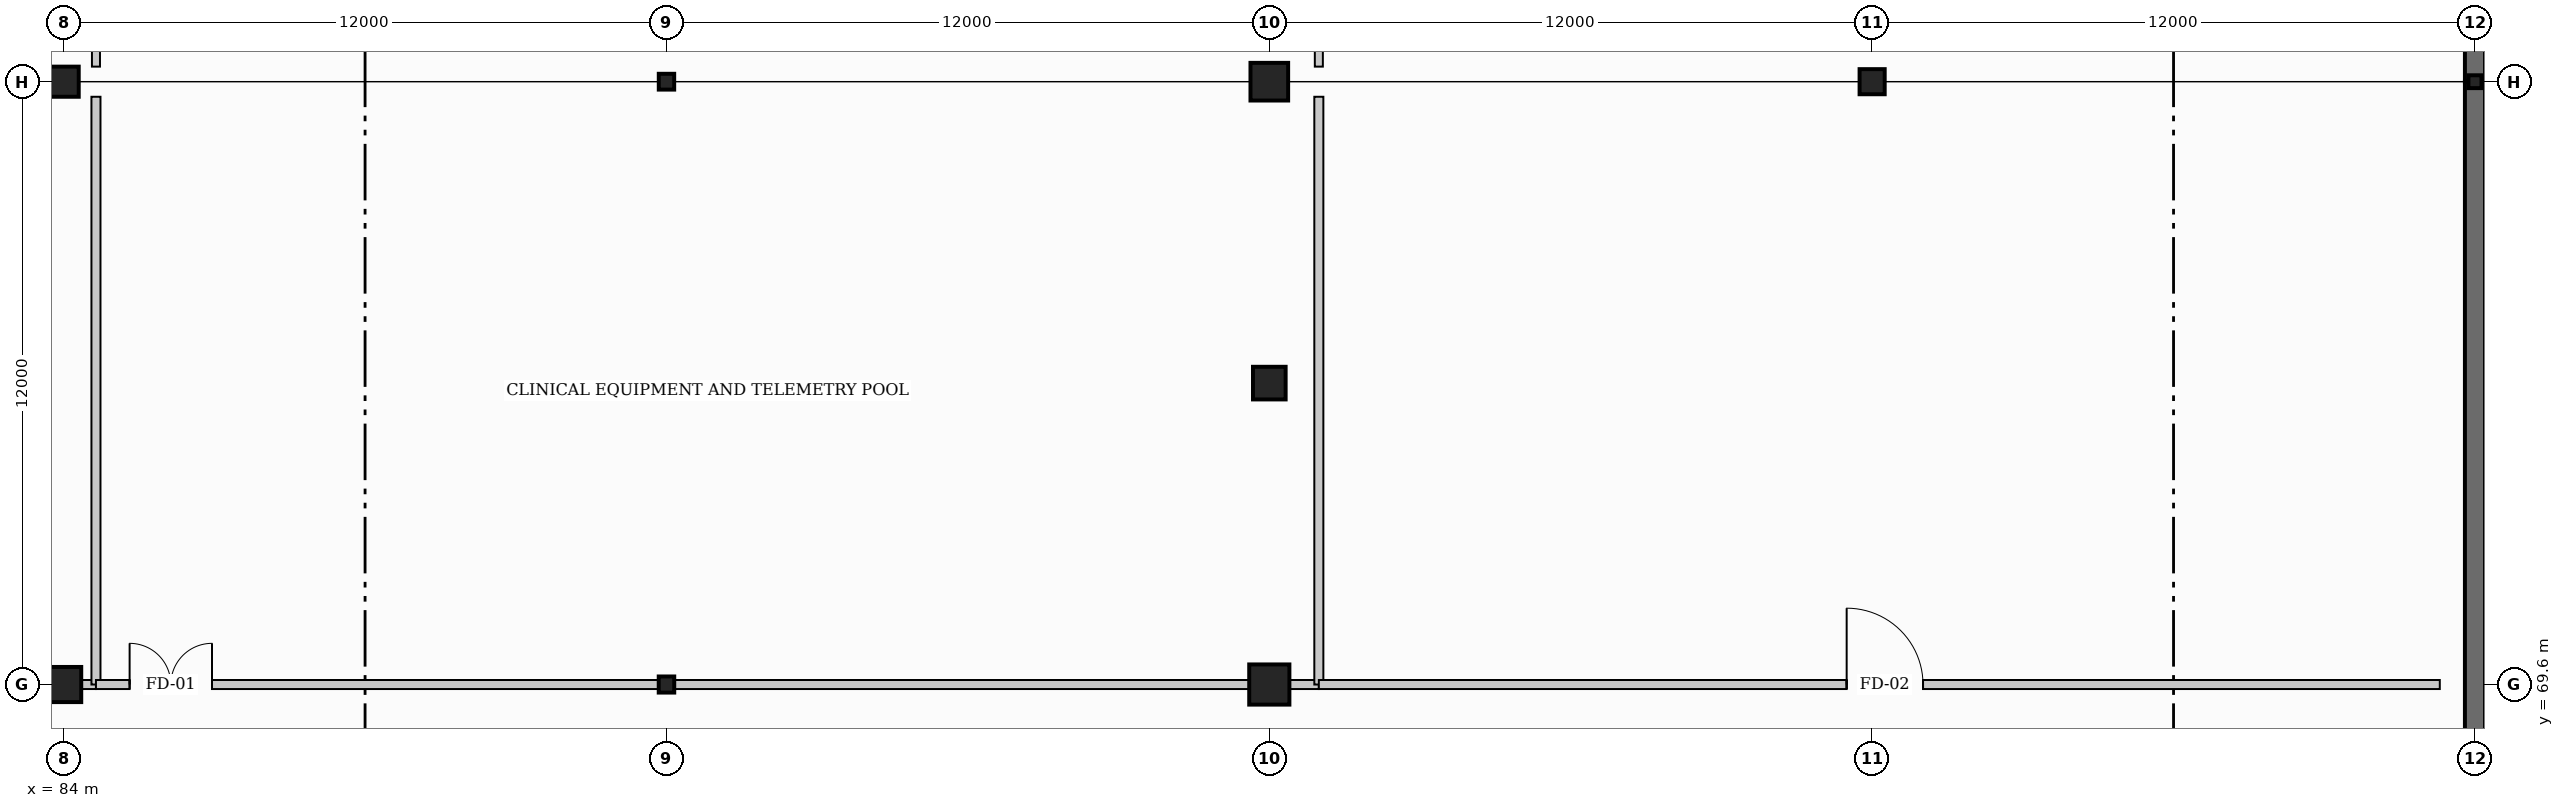
"""IFC4 building model, lengths in metres.
Left out: names, types, materials, properties, quantities, classifications, styles, units other than length and angle.
Written with IfcOpenShell. Run it as: python <this file> out.ifc"""

import sys

from ifc_helpers import new_model, si_unit, direction, frame, frame_2d, origin, origin_2d, place, context, subcontext, project, spatial, rectangle, i_section, extrude, element, fill, save


model = new_model("IFC4")
c1 = context("Model", 3, precision=1e-05, world=origin(), true_north=direction((0.0, 1.0)))
c2 = subcontext(c1, "Body", "Model", "MODEL_VIEW")
j1 = project(units=[si_unit("LENGTHUNIT", "METRE"), si_unit("PLANEANGLEUNIT", "RADIAN")], contexts=[c1])
p1 = place(None, origin())
s1 = spatial("IfcSite", under=j1, at=p1, CompositionType="ELEMENT")
p2 = place(p1, origin())
s2 = spatial("IfcBuilding", under=s1, at=p2, CompositionType="ELEMENT")
p3 = place(p2, frame((0.0, 0.0, -4.8)))
s3 = spatial("IfcBuildingStorey", under=s2, at=p3, CompositionType="ELEMENT", Elevation=-4.8)
p4 = place(p3, frame((132.0, 81.6, 0.0), z_axis=(0.0, 0.0, 1.0), x_axis=(0.0, 1.0, 0.0)))
e1 = element("IfcWall", 1, at=p4, inside=s3, PredefinedType="USERDEFINED", context=c2, shape_type="SweptSolid", body=[
    extrude(rectangle(XDim=44.0, YDim=0.4, at=frame_2d((22.0, 0.0))), origin(), (0.0, 0.0, 1.0), 4.8),
])
p5 = place(p3, frame((132.0, 45.6, 0.0), z_axis=(0.0, 0.0, 1.0), x_axis=(0.0, 1.0, 0.0)))
e2 = element("IfcWall", 2, at=p5, inside=s3, PredefinedType="USERDEFINED", context=c2, shape_type="SweptSolid", body=[
    extrude(rectangle(XDim=36.0, YDim=0.4, at=frame_2d((18.0, 0.0))), origin(), (0.0, 0.0, 1.0), 4.8),
])
p6 = place(p3, frame((84.0, 69.6, 0.0), z_axis=(0.0, 0.0, 1.0), x_axis=(0.0, 1.0, 0.0)))
e3 = element("IfcColumn", 3, at=p6, inside=s3, PredefinedType="COLUMN", context=c2, shape_type="SweptSolid", body=[
    extrude(rectangle(XDim=0.7, YDim=0.7, at=origin_2d()), origin(), (0.0, 0.0, 1.0), 4.8),
])
p7 = place(p3, frame((84.0, 81.6, 0.0), z_axis=(0.0, 0.0, 1.0), x_axis=(0.0, 1.0, 0.0)))
e4 = element("IfcColumn", 4, at=p7, inside=s3, PredefinedType="COLUMN", context=c2, shape_type="SweptSolid", body=[
    extrude(rectangle(XDim=0.6, YDim=0.6, at=origin_2d()), origin(), (0.0, 0.0, 1.0), 4.8),
])
p8 = place(p3, frame((96.0, 69.6, 0.0), z_axis=(0.0, 0.0, 1.0), x_axis=(1.0, 0.0, 0.0)))
e5 = element("IfcColumn", 5, at=p8, inside=s3, PredefinedType="COLUMN", context=c2, shape_type="SweptSolid", body=[
    extrude(i_section(OverallWidth=0.309, OverallDepth=0.321, WebThickness=0.014, FlangeThickness=0.022, at=origin_2d()), origin(), (0.0, 0.0, 1.0), 4.8),
])
p9 = place(p3, frame((96.0, 81.6, 0.0), z_axis=(0.0, 0.0, 1.0), x_axis=(1.0, 0.0, 0.0)))
e6 = element("IfcColumn", 6, at=p9, inside=s3, PredefinedType="COLUMN", context=c2, shape_type="SweptSolid", body=[
    extrude(i_section(OverallWidth=0.307, OverallDepth=0.315, WebThickness=0.012, FlangeThickness=0.019, at=origin_2d()), origin(), (0.0, 0.0, 1.0), 4.8),
])
p10 = place(p3, frame((108.0, 69.6, 0.0), z_axis=(0.0, 0.0, 1.0), x_axis=(0.0, 1.0, 0.0)))
e7 = element("IfcColumn", 7, at=p10, inside=s3, PredefinedType="COLUMN", context=c2, shape_type="SweptSolid", body=[
    extrude(rectangle(XDim=0.8, YDim=0.8, at=origin_2d()), origin(), (0.0, 0.0, 1.0), 4.8),
])
p11 = place(p3, frame((108.0, 81.6, 0.0), z_axis=(0.0, 0.0, 1.0), x_axis=(0.0, 1.0, 0.0)))
e8 = element("IfcColumn", 8, at=p11, inside=s3, PredefinedType="COLUMN", context=c2, shape_type="SweptSolid", body=[
    extrude(rectangle(XDim=0.75, YDim=0.75, at=origin_2d()), origin(), (0.0, 0.0, 1.0), 4.8),
])
p12 = place(p3, frame((120.0, 81.6, 0.0), z_axis=(0.0, 0.0, 1.0), x_axis=(1.0, 0.0, 0.0)))
e9 = element("IfcColumn", 9, at=p12, inside=s3, PredefinedType="COLUMN", context=c2, shape_type="SweptSolid", body=[
    extrude(i_section(OverallWidth=0.5, OverallDepth=0.5, WebThickness=0.022, FlangeThickness=0.036, at=origin_2d()), origin(), (0.0, 0.0, 1.0), 4.8),
])
p13 = place(p3, frame((132.0, 81.6, 0.0), z_axis=(0.0, 0.0, 1.0), x_axis=(0.0, 1.0, 0.0)))
e10 = element("IfcColumn", 10, at=p13, inside=s3, PredefinedType="COLUMN", context=c2, shape_type="SweptSolid", body=[
    extrude(i_section(OverallWidth=0.256, OverallDepth=0.26, WebThickness=0.01, FlangeThickness=0.017, at=origin_2d()), origin(), (0.0, 0.0, 1.0), 4.8),
])
p14 = place(p3, frame((108.0, 75.6, 0.0), z_axis=(0.0, 0.0, 1.0), x_axis=(1.0, 0.0, 0.0)))
e11 = element("IfcColumn", 11, at=p14, inside=s3, PredefinedType="COLUMN", context=c2, shape_type="SweptSolid", body=[
    extrude(rectangle(XDim=0.65, YDim=0.65, at=origin_2d()), origin(), (0.0, 0.0, 1.0), 4.8),
])
p15 = place(p3, frame((60.3, 69.6, 0.0), z_axis=(0.0, 0.0, 1.0), x_axis=(1.0, 0.0, 0.0)))
e12 = element("IfcWall", 12, at=p15, inside=s3, PredefinedType="PARTITIONING", context=c2, shape_type="SweptSolid", body=[
    extrude(rectangle(XDim=24.343, YDim=0.18, at=frame_2d((12.171, 0.0))), origin(), (0.0, 0.0, 1.0), 3.465),
])
p16 = place(p15, frame((0.32, 0.0, 0.0)))
e13 = element("IfcOpeningElement", 13, at=p16, cuts=e12, PredefinedType="OPENING", context=c2, shape_type="SweptSolid", body=[
    extrude(rectangle(XDim=1.16, YDim=2.1, at=frame_2d((0.58, 1.05))), frame((0.0, 0.1, 0.0), z_axis=(0.0, -1.0, 0.0), x_axis=(1.0, 0.0, 0.0)), (0.0, 0.0, 1.0), 0.2),
])
p17 = place(p3, frame((84.643, 69.6, 0.0), z_axis=(0.0, 0.0, 1.0), x_axis=(0.0, 1.0, 0.0)))
e14 = element("IfcWall", 14, at=p17, inside=s3, PredefinedType="PARTITIONING", context=c2, shape_type="SweptSolid", body=[
    extrude(rectangle(XDim=11.7, YDim=0.18, at=frame_2d((5.85, 0.0))), origin(), (0.0, 0.0, 1.0), 3.515),
])
p18 = place(p3, frame((84.643, 69.6, 0.0), z_axis=(0.0, 0.0, 1.0), x_axis=(1.0, 0.0, 0.0)))
e15 = element("IfcWall", 15, at=p18, inside=s3, PredefinedType="PARTITIONING", context=c2, shape_type="SweptSolid", body=[
    extrude(rectangle(XDim=24.343, YDim=0.18, at=frame_2d((12.171, 0.0))), origin(), (0.0, 0.0, 1.0), 3.515),
])
p19 = place(p18, frame((0.67, 0.0, 0.0)))
e16 = element("IfcOpeningElement", 16, at=p19, cuts=e15, PredefinedType="OPENING", context=c2, shape_type="SweptSolid", body=[
    extrude(rectangle(XDim=1.64, YDim=2.2, at=frame_2d((0.82, 1.1))), frame((0.0, 0.1, 0.0), z_axis=(0.0, -1.0, 0.0), x_axis=(1.0, 0.0, 0.0)), (0.0, 0.0, 1.0), 0.2),
])
p20 = place(p3, frame((108.986, 69.6, 0.0), z_axis=(0.0, 0.0, 1.0), x_axis=(0.0, 1.0, 0.0)))
e17 = element("IfcWall", 17, at=p20, inside=s3, PredefinedType="PARTITIONING", context=c2, shape_type="SweptSolid", body=[
    extrude(rectangle(XDim=11.7, YDim=0.18, at=frame_2d((5.85, 0.0))), origin(), (0.0, 0.0, 1.0), 3.803),
])
p21 = place(p3, frame((108.986, 69.6, 0.0), z_axis=(0.0, 0.0, 1.0), x_axis=(1.0, 0.0, 0.0)))
e18 = element("IfcWall", 18, at=p21, inside=s3, PredefinedType="PARTITIONING", context=c2, shape_type="SweptSolid", body=[
    extrude(rectangle(XDim=22.314, YDim=0.18, at=frame_2d((11.157, 0.0))), origin(), (0.0, 0.0, 1.0), 4.43),
])
p22 = place(p21, frame((10.507, 0.0, 0.0)))
e19 = element("IfcOpeningElement", 19, at=p22, cuts=e18, PredefinedType="OPENING", context=c2, shape_type="SweptSolid", body=[
    extrude(rectangle(XDim=1.52, YDim=2.16, at=frame_2d((0.76, 1.08))), frame((0.0, 0.1, 0.0), z_axis=(0.0, -1.0, 0.0), x_axis=(1.0, 0.0, 0.0)), (0.0, 0.0, 1.0), 0.2),
])
p23 = place(p3, frame((84.643, 81.9, 0.0), z_axis=(0.0, 0.0, 1.0), x_axis=(0.0, 1.0, 0.0)))
e20 = element("IfcWall", 20, at=p23, inside=s3, PredefinedType="PARTITIONING", context=c2, shape_type="SweptSolid", body=[
    extrude(rectangle(XDim=17.5, YDim=0.16, at=frame_2d((8.75, 0.0))), origin(), (0.0, 0.0, 1.0), 3.515),
])
p24 = place(p3, frame((108.986, 81.9, 0.0), z_axis=(0.0, 0.0, 1.0), x_axis=(0.0, 1.0, 0.0)))
e21 = element("IfcWall", 21, at=p24, inside=s3, PredefinedType="PARTITIONING", context=c2, shape_type="SweptSolid", body=[
    extrude(rectangle(XDim=17.5, YDim=0.16, at=frame_2d((8.75, 0.0))), origin(), (0.0, 0.0, 1.0), 3.803),
])
p25 = place(p19, origin())
e22 = element("IfcDoor", 22, at=p25, inside=s3, OperationType="DOUBLE_DOOR_SINGLE_SWING", PredefinedType="DOOR", context=c2, shape_type="SweptSolid", body=[
    extrude(rectangle(XDim=1.64, YDim=2.2, at=frame_2d((0.82, 1.1))), frame((0.0, 0.025, 0.0), z_axis=(0.0, -1.0, 0.0), x_axis=(1.0, 0.0, 0.0)), (0.0, 0.0, 1.0), 0.05),
])
fill(e16, e22)
p26 = place(p22, origin())
e23 = element("IfcDoor", 23, at=p26, inside=s3, OperationType="SINGLE_SWING_LEFT", PredefinedType="DOOR", context=c2, shape_type="SweptSolid", body=[
    extrude(rectangle(XDim=1.52, YDim=2.16, at=frame_2d((0.76, 1.08))), frame((0.0, 0.025, 0.0), z_axis=(0.0, -1.0, 0.0), x_axis=(1.0, 0.0, 0.0)), (0.0, 0.0, 1.0), 0.05),
])
fill(e19, e23)
save(model, sys.argv[1])
